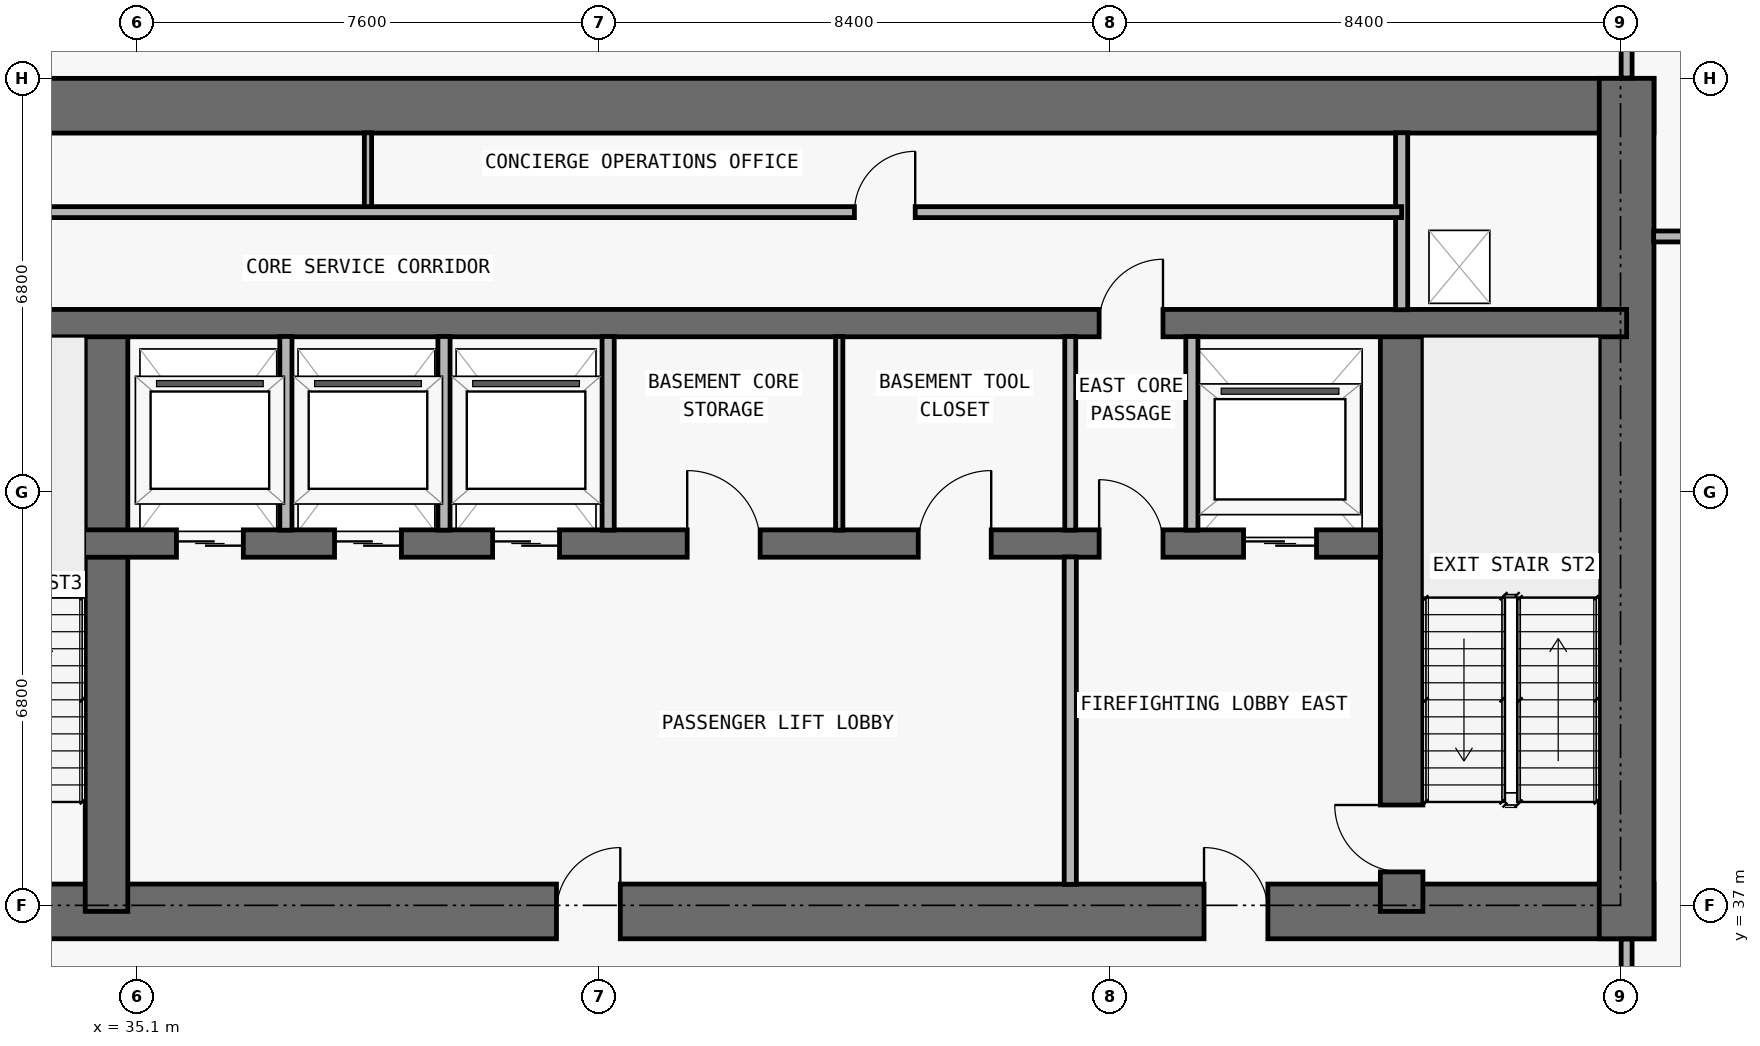
"""IFC4 building model, lengths in metres.
Left out: names, types, materials, properties, quantities, classifications, styles, units other than length and angle.
Written with IfcOpenShell. Run it as: python <this file> out.ifc"""

import sys

from ifc_helpers import new_model, si_unit, direction, frame, frame_2d, origin, place, context, subcontext, project, spatial, rectangle, extrude, element, fill, save


model = new_model("IFC4")
c1 = context("Model", 3, precision=1e-05, world=origin(), true_north=direction((0.0, 1.0)))
c2 = subcontext(c1, "Body", "Model", "MODEL_VIEW")
j1 = project(units=[si_unit("LENGTHUNIT", "METRE"), si_unit("PLANEANGLEUNIT", "RADIAN")], contexts=[c1])
p1 = place(None, origin())
s1 = spatial("IfcSite", under=j1, at=p1, CompositionType="ELEMENT")
p2 = place(p1, origin())
s2 = spatial("IfcBuilding", under=s1, at=p2, CompositionType="ELEMENT")
p3 = place(p2, frame((0.0, 0.0, -4.5)))
s3 = spatial("IfcBuildingStorey", under=s2, at=p3, CompositionType="ELEMENT", Elevation=-4.5)
p4 = place(p3, frame((17.75, 36.9, 0.0), z_axis=(0.0, 0.0, 1.0), x_axis=(1.0, 0.0, 0.0)))
e1 = element("IfcWall", 1, at=p4, inside=s3, PredefinedType="SHEAR", context=c2, shape_type="SweptSolid", body=[
    extrude(rectangle(XDim=42.3, YDim=0.9, at=frame_2d((21.15, 0.0))), origin(), (0.0, 0.0, 1.0), 4.2),
])
p5 = place(p4, frame((14.55, 0.0, 0.0)))
e2 = element("IfcOpeningElement", 2, at=p5, cuts=e1, PredefinedType="OPENING", context=c2, shape_type="SweptSolid", body=[
    extrude(rectangle(XDim=1.1, YDim=2.15, at=frame_2d((0.55, 1.075))), frame((0.0, 0.46, 0.0), z_axis=(0.0, -1.0, 0.0), x_axis=(1.0, 0.0, 0.0)), (0.0, 0.0, 1.0), 0.92),
])
p6 = place(p4, frame((6.4, 0.0, 0.0)))
e3 = element("IfcOpeningElement", 3, at=p6, cuts=e1, PredefinedType="OPENING", context=c2, shape_type="SweptSolid", body=[
    extrude(rectangle(XDim=1.05, YDim=2.15, at=frame_2d((0.525, 1.075))), frame((0.0, 0.46, 0.0), z_axis=(0.0, -1.0, 0.0), x_axis=(1.0, 0.0, 0.0)), (0.0, 0.0, 1.0), 0.92),
])
p7 = place(p4, frame((34.9, 0.0, 0.0)))
e4 = element("IfcOpeningElement", 4, at=p7, cuts=e1, PredefinedType="OPENING", context=c2, shape_type="SweptSolid", body=[
    extrude(rectangle(XDim=1.05, YDim=2.15, at=frame_2d((0.525, 1.075))), frame((0.0, 0.46, 0.0), z_axis=(0.0, -1.0, 0.0), x_axis=(1.0, 0.0, 0.0)), (0.0, 0.0, 1.0), 0.92),
])
p8 = place(p4, frame((11.012, 0.0, 0.0)))
e5 = element("IfcOpeningElement", 5, at=p8, cuts=e1, PredefinedType="OPENING", context=c2, shape_type="SweptSolid", body=[
    extrude(rectangle(XDim=1.05, YDim=2.15, at=frame_2d((0.525, 1.075))), frame((0.0, 0.46, 0.0), z_axis=(0.0, -1.0, 0.0), x_axis=(1.0, 0.0, 0.0)), (0.0, 0.0, 1.0), 0.92),
])
p9 = place(p4, frame((24.25, 0.0, 0.0)))
e6 = element("IfcOpeningElement", 6, at=p9, cuts=e1, PredefinedType="OPENING", context=c2, shape_type="SweptSolid", body=[
    extrude(rectangle(XDim=1.05, YDim=2.15, at=frame_2d((0.525, 1.075))), frame((0.0, 0.46, 0.0), z_axis=(0.0, -1.0, 0.0), x_axis=(1.0, 0.0, 0.0)), (0.0, 0.0, 1.0), 0.92),
])
p10 = place(p3, frame((17.75, 50.15, 0.0), z_axis=(0.0, 0.0, 1.0), x_axis=(1.0, 0.0, 0.0)))
e7 = element("IfcWall", 7, at=p10, inside=s3, PredefinedType="SHEAR", context=c2, shape_type="SweptSolid", body=[
    extrude(rectangle(XDim=42.3, YDim=0.9, at=frame_2d((21.15, 0.0))), origin(), (0.0, 0.0, 1.0), 4.2),
])
p11 = place(p3, frame((59.6, 36.45, 0.0), z_axis=(0.0, 0.0, 1.0), x_axis=(0.0, 1.0, 0.0)))
e8 = element("IfcWall", 8, at=p11, inside=s3, PredefinedType="SHEAR", context=c2, shape_type="SweptSolid", body=[
    extrude(rectangle(XDim=14.15, YDim=0.9, at=frame_2d((7.075, 0.0))), origin(), (0.0, 0.0, 1.0), 4.2),
])
p12 = place(p3, frame((55.9, 36.9, 0.0), z_axis=(0.0, 0.0, 1.0), x_axis=(0.0, 1.0, 0.0)))
e9 = element("IfcWall", 9, at=p12, inside=s3, PredefinedType="SHEAR", context=c2, shape_type="SweptSolid", body=[
    extrude(rectangle(XDim=9.675, YDim=0.7, at=frame_2d((4.837, 0.0))), origin(), (0.0, 0.0, 1.0), 4.2),
])
p13 = place(p12, frame((0.65, 0.0, 0.0)))
e10 = element("IfcOpeningElement", 10, at=p13, cuts=e9, PredefinedType="OPENING", context=c2, shape_type="SweptSolid", body=[
    extrude(rectangle(XDim=1.1, YDim=2.15, at=frame_2d((0.55, 1.075))), frame((0.0, 0.36, 0.0), z_axis=(0.0, -1.0, 0.0), x_axis=(1.0, 0.0, 0.0)), (0.0, 0.0, 1.0), 0.72),
])
p14 = place(p3, frame((34.6, 36.9, 0.0), z_axis=(0.0, 0.0, 1.0), x_axis=(0.0, 1.0, 0.0)))
e11 = element("IfcWall", 11, at=p14, inside=s3, PredefinedType="SHEAR", context=c2, shape_type="SweptSolid", body=[
    extrude(rectangle(XDim=9.675, YDim=0.7, at=frame_2d((4.837, 0.0))), origin(), (0.0, 0.0, 1.0), 4.2),
])
p15 = place(p3, frame((22.25, 42.95, 0.0), z_axis=(0.0, 0.0, 1.0), x_axis=(1.0, 0.0, 0.0)))
e12 = element("IfcWall", 12, at=p15, inside=s3, PredefinedType="SHEAR", context=c2, shape_type="SweptSolid", body=[
    extrude(rectangle(XDim=33.3, YDim=0.45, at=frame_2d((16.65, 0.0))), origin(), (0.0, 0.0, 1.0), 4.2),
])
p16 = place(p15, frame((1.05, 0.0, 0.0)))
e13 = element("IfcOpeningElement", 13, at=p16, cuts=e12, PredefinedType="OPENING", context=c2, shape_type="SweptSolid", body=[
    extrude(rectangle(XDim=1.2, YDim=2.2, at=frame_2d((0.6, 1.1))), frame((0.0, 0.235, 0.0), z_axis=(0.0, -1.0, 0.0), x_axis=(1.0, 0.0, 0.0)), (0.0, 0.0, 1.0), 0.47),
])
p17 = place(p15, frame((31.05, 0.0, 0.0)))
e14 = element("IfcOpeningElement", 14, at=p17, cuts=e12, PredefinedType="OPENING", context=c2, shape_type="SweptSolid", body=[
    extrude(rectangle(XDim=1.2, YDim=2.2, at=frame_2d((0.6, 1.1))), frame((0.0, 0.235, 0.0), z_axis=(0.0, -1.0, 0.0), x_axis=(1.0, 0.0, 0.0)), (0.0, 0.0, 1.0), 0.47),
])
p18 = place(p15, frame((13.5, 0.0, 0.0)))
e15 = element("IfcOpeningElement", 15, at=p18, cuts=e12, PredefinedType="OPENING", context=c2, shape_type="SweptSolid", body=[
    extrude(rectangle(XDim=1.1, YDim=2.2, at=frame_2d((0.55, 1.1))), frame((0.0, 0.235, 0.0), z_axis=(0.0, -1.0, 0.0), x_axis=(1.0, 0.0, 0.0)), (0.0, 0.0, 1.0), 0.47),
])
p19 = place(p15, frame((16.1, 0.0, 0.0)))
e16 = element("IfcOpeningElement", 16, at=p19, cuts=e12, PredefinedType="OPENING", context=c2, shape_type="SweptSolid", body=[
    extrude(rectangle(XDim=1.1, YDim=2.2, at=frame_2d((0.55, 1.1))), frame((0.0, 0.235, 0.0), z_axis=(0.0, -1.0, 0.0), x_axis=(1.0, 0.0, 0.0)), (0.0, 0.0, 1.0), 0.47),
])
p20 = place(p15, frame((18.7, 0.0, 0.0)))
e17 = element("IfcOpeningElement", 17, at=p20, cuts=e12, PredefinedType="OPENING", context=c2, shape_type="SweptSolid", body=[
    extrude(rectangle(XDim=1.1, YDim=2.2, at=frame_2d((0.55, 1.1))), frame((0.0, 0.235, 0.0), z_axis=(0.0, -1.0, 0.0), x_axis=(1.0, 0.0, 0.0)), (0.0, 0.0, 1.0), 0.47),
])
p21 = place(p15, frame((3.625, 0.0, 0.0)))
e18 = element("IfcOpeningElement", 18, at=p21, cuts=e12, PredefinedType="OPENING", context=c2, shape_type="SweptSolid", body=[
    extrude(rectangle(XDim=1.05, YDim=2.15, at=frame_2d((0.525, 1.075))), frame((0.0, 0.235, 0.0), z_axis=(0.0, -1.0, 0.0), x_axis=(1.0, 0.0, 0.0)), (0.0, 0.0, 1.0), 0.47),
])
p22 = place(p15, frame((28.675, 0.0, 0.0)))
e19 = element("IfcOpeningElement", 19, at=p22, cuts=e12, PredefinedType="OPENING", context=c2, shape_type="SweptSolid", body=[
    extrude(rectangle(XDim=1.05, YDim=2.15, at=frame_2d((0.525, 1.075))), frame((0.0, 0.235, 0.0), z_axis=(0.0, -1.0, 0.0), x_axis=(1.0, 0.0, 0.0)), (0.0, 0.0, 1.0), 0.47),
])
p23 = place(p15, frame((6.538, 0.0, 0.0)))
e20 = element("IfcOpeningElement", 20, at=p23, cuts=e12, PredefinedType="OPENING", context=c2, shape_type="SweptSolid", body=[
    extrude(rectangle(XDim=1.0, YDim=2.2, at=frame_2d((0.5, 1.1))), frame((0.0, 0.235, 0.0), z_axis=(0.0, -1.0, 0.0), x_axis=(1.0, 0.0, 0.0)), (0.0, 0.0, 1.0), 0.47),
])
p24 = place(p15, frame((21.9, 0.0, 0.0)))
e21 = element("IfcOpeningElement", 21, at=p24, cuts=e12, PredefinedType="OPENING", context=c2, shape_type="SweptSolid", body=[
    extrude(rectangle(XDim=1.2, YDim=2.2, at=frame_2d((0.6, 1.1))), frame((0.0, 0.235, 0.0), z_axis=(0.0, -1.0, 0.0), x_axis=(1.0, 0.0, 0.0)), (0.0, 0.0, 1.0), 0.47),
])
p25 = place(p15, frame((25.7, 0.0, 0.0)))
e22 = element("IfcOpeningElement", 22, at=p25, cuts=e12, PredefinedType="OPENING", context=c2, shape_type="SweptSolid", body=[
    extrude(rectangle(XDim=1.2, YDim=2.2, at=frame_2d((0.6, 1.1))), frame((0.0, 0.235, 0.0), z_axis=(0.0, -1.0, 0.0), x_axis=(1.0, 0.0, 0.0)), (0.0, 0.0, 1.0), 0.47),
])
p26 = place(p3, frame((18.2, 46.575, 0.0), z_axis=(0.0, 0.0, 1.0), x_axis=(1.0, 0.0, 0.0)))
e23 = element("IfcWall", 23, at=p26, inside=s3, PredefinedType="SHEAR", context=c2, shape_type="SweptSolid", body=[
    extrude(rectangle(XDim=41.4, YDim=0.45, at=frame_2d((20.7, 0.0))), origin(), (0.0, 0.0, 1.0), 4.2),
])
p27 = place(p26, frame((7.675, 0.0, 0.0)))
e24 = element("IfcOpeningElement", 24, at=p27, cuts=e23, PredefinedType="OPENING", context=c2, shape_type="SweptSolid", body=[
    extrude(rectangle(XDim=1.05, YDim=2.15, at=frame_2d((0.525, 1.075))), frame((0.0, 0.235, 0.0), z_axis=(0.0, -1.0, 0.0), x_axis=(1.0, 0.0, 0.0)), (0.0, 0.0, 1.0), 0.47),
])
p28 = place(p26, frame((32.725, 0.0, 0.0)))
e25 = element("IfcOpeningElement", 25, at=p28, cuts=e23, PredefinedType="OPENING", context=c2, shape_type="SweptSolid", body=[
    extrude(rectangle(XDim=1.05, YDim=2.15, at=frame_2d((0.525, 1.075))), frame((0.0, 0.235, 0.0), z_axis=(0.0, -1.0, 0.0), x_axis=(1.0, 0.0, 0.0)), (0.0, 0.0, 1.0), 0.47),
])
p29 = place(p3, frame((37.55, 43.17, 0.0), z_axis=(0.0, 0.0, 1.0), x_axis=(0.0, 1.0, 0.0)))
e26 = element("IfcWall", 26, at=p29, inside=s3, PredefinedType="PARTITIONING", context=c2, shape_type="SweptSolid", body=[
    extrude(rectangle(XDim=3.185, YDim=0.2, at=frame_2d((1.593, 0.0))), origin(), (0.0, 0.0, 1.0), 4.2),
])
p30 = place(p3, frame((38.9, 48.4, 0.0), z_axis=(0.0, 0.0, 1.0), x_axis=(0.0, 1.0, 0.0)))
e27 = element("IfcWall", 27, at=p30, inside=s3, PredefinedType="PARTITIONING", context=c2, shape_type="SweptSolid", body=[
    extrude(rectangle(XDim=1.305, YDim=0.12, at=frame_2d((0.653, 0.0))), origin(), (0.0, 0.0, 1.0), 4.2),
])
for number, where, z_axis, x_axis in (
    (28, (40.15, 43.17, 0.0), (0.0, 0.0, 1.0), (0.0, 1.0, 0.0)),
    (29, (42.85, 43.17, 0.0), (0.0, 0.0, 1.0), (0.0, 1.0, 0.0)),
):
    element("IfcWall", number, at=place(p3, frame(where, z_axis=z_axis, x_axis=x_axis)), inside=s3, PredefinedType="PARTITIONING", context=c2, shape_type="SweptSolid", body=[
        extrude(rectangle(XDim=3.185, YDim=0.2, at=frame_2d((1.593, 0.0))), origin(), (0.0, 0.0, 1.0), 4.2),
    ])
p31 = place(p3, frame((46.65, 43.17, 0.0), z_axis=(0.0, 0.0, 1.0), x_axis=(0.0, 1.0, 0.0)))
e30 = element("IfcWall", 30, at=p31, inside=s3, PredefinedType="PARTITIONING", context=c2, shape_type="SweptSolid", body=[
    extrude(rectangle(XDim=3.185, YDim=0.12, at=frame_2d((1.593, 0.0))), origin(), (0.0, 0.0, 1.0), 4.2),
])
p32 = place(p3, frame((50.45, 37.345, 0.0), z_axis=(0.0, 0.0, 1.0), x_axis=(0.0, 1.0, 0.0)))
e31 = element("IfcWall", 31, at=p32, inside=s3, PredefinedType="PARTITIONING", context=c2, shape_type="SweptSolid", body=[
    extrude(rectangle(XDim=5.385, YDim=0.2, at=frame_2d((2.692, 0.0))), origin(), (0.0, 0.0, 1.0), 4.2),
])
p33 = place(p3, frame((50.45, 43.17, 0.0), z_axis=(0.0, 0.0, 1.0), x_axis=(0.0, 1.0, 0.0)))
e32 = element("IfcWall", 32, at=p33, inside=s3, PredefinedType="PARTITIONING", context=c2, shape_type="SweptSolid", body=[
    extrude(rectangle(XDim=3.185, YDim=0.18, at=frame_2d((1.593, 0.0))), origin(), (0.0, 0.0, 1.0), 4.2),
])
p34 = place(p3, frame((52.45, 43.17, 0.0), z_axis=(0.0, 0.0, 1.0), x_axis=(0.0, 1.0, 0.0)))
e33 = element("IfcWall", 33, at=p34, inside=s3, PredefinedType="PARTITIONING", context=c2, shape_type="SweptSolid", body=[
    extrude(rectangle(XDim=3.185, YDim=0.2, at=frame_2d((1.593, 0.0))), origin(), (0.0, 0.0, 1.0), 4.2),
])
p35 = place(p3, frame((55.9, 46.795, 0.0), z_axis=(0.0, 0.0, 1.0), x_axis=(0.0, 1.0, 0.0)))
e34 = element("IfcWall", 34, at=p35, inside=s3, PredefinedType="PARTITIONING", context=c2, shape_type="SweptSolid", body=[
    extrude(rectangle(XDim=2.91, YDim=0.2, at=frame_2d((1.455, 0.0))), origin(), (0.0, 0.0, 1.0), 4.2),
])
p36 = place(p3, frame((59.6, 34.4, 0.0), z_axis=(0.0, 0.0, 1.0), x_axis=(0.0, 1.0, 0.0)))
e35 = element("IfcWall", 35, at=p36, inside=s3, PredefinedType="PARTITIONING", context=c2, shape_type="SweptSolid", body=[
    extrude(rectangle(XDim=2.045, YDim=0.18, at=frame_2d((1.022, 0.0))), origin(), (0.0, 0.0, 1.0), 3.085),
])
p37 = place(p3, frame((59.6, 50.605, 0.0), z_axis=(0.0, 0.0, 1.0), x_axis=(0.0, 1.0, 0.0)))
e36 = element("IfcWall", 36, at=p37, inside=s3, PredefinedType="PARTITIONING", context=c2, shape_type="SweptSolid", body=[
    extrude(rectangle(XDim=2.195, YDim=0.18, at=frame_2d((1.098, 0.0))), origin(), (0.0, 0.0, 1.0), 4.2),
])
p38 = place(p3, frame((60.045, 48.0, 0.0), z_axis=(0.0, 0.0, 1.0), x_axis=(1.0, 0.0, 0.0)))
e37 = element("IfcWall", 37, at=p38, inside=s3, PredefinedType="PARTITIONING", context=c2, shape_type="SweptSolid", body=[
    extrude(rectangle(XDim=9.6, YDim=0.18, at=frame_2d((4.8, 0.0))), origin(), (0.0, 0.0, 1.0), 4.2),
])
p39 = place(p38, frame((2.302, 0.0, 0.0)))
e38 = element("IfcOpeningElement", 38, at=p39, cuts=e37, PredefinedType="OPENING", context=c2, shape_type="SweptSolid", body=[
    extrude(rectangle(XDim=0.85, YDim=2.1, at=frame_2d((0.425, 1.05))), frame((0.0, 0.1, 0.0), z_axis=(0.0, -1.0, 0.0), x_axis=(1.0, 0.0, 0.0)), (0.0, 0.0, 1.0), 0.2),
])
p40 = place(p3, frame((21.9, 48.4, 0.0), z_axis=(0.0, 0.0, 1.0), x_axis=(1.0, 0.0, 0.0)))
e39 = element("IfcWall", 39, at=p40, inside=s3, PredefinedType="PARTITIONING", context=c2, shape_type="SweptSolid", body=[
    extrude(rectangle(XDim=34.0, YDim=0.18, at=frame_2d((17.0, 0.0))), origin(), (0.0, 0.0, 1.0), 4.2),
])
p41 = place(p40, frame((8.0, 0.0, 0.0)))
e40 = element("IfcOpeningElement", 40, at=p41, cuts=e39, PredefinedType="OPENING", context=c2, shape_type="SweptSolid", body=[
    extrude(rectangle(XDim=1.0, YDim=2.2, at=frame_2d((0.5, 1.1))), frame((0.0, 0.1, 0.0), z_axis=(0.0, -1.0, 0.0), x_axis=(1.0, 0.0, 0.0)), (0.0, 0.0, 1.0), 0.2),
])
p42 = place(p40, frame((25.0, 0.0, 0.0)))
e41 = element("IfcOpeningElement", 41, at=p42, cuts=e39, PredefinedType="OPENING", context=c2, shape_type="SweptSolid", body=[
    extrude(rectangle(XDim=1.0, YDim=2.2, at=frame_2d((0.5, 1.1))), frame((0.0, 0.1, 0.0), z_axis=(0.0, -1.0, 0.0), x_axis=(1.0, 0.0, 0.0)), (0.0, 0.0, 1.0), 0.2),
])
p43 = place(p17, origin())
e42 = element("IfcDoor", 42, at=p43, inside=s3, OperationType="DOUBLE_DOOR_SLIDING", PredefinedType="DOOR", context=c2, shape_type="SweptSolid", body=[
    extrude(rectangle(XDim=1.2, YDim=2.2, at=frame_2d((0.6, 1.1))), frame((0.0, 0.025, 0.0), z_axis=(0.0, -1.0, 0.0), x_axis=(1.0, 0.0, 0.0)), (0.0, 0.0, 1.0), 0.05),
])
fill(e14, e42)
p44 = place(p18, origin())
e43 = element("IfcDoor", 43, at=p44, inside=s3, OperationType="DOUBLE_DOOR_SLIDING", PredefinedType="DOOR", context=c2, shape_type="SweptSolid", body=[
    extrude(rectangle(XDim=1.1, YDim=2.2, at=frame_2d((0.55, 1.1))), frame((0.0, 0.025, 0.0), z_axis=(0.0, -1.0, 0.0), x_axis=(1.0, 0.0, 0.0)), (0.0, 0.0, 1.0), 0.05),
])
fill(e15, e43)
p45 = place(p19, origin())
e44 = element("IfcDoor", 44, at=p45, inside=s3, OperationType="DOUBLE_DOOR_SLIDING", PredefinedType="DOOR", context=c2, shape_type="SweptSolid", body=[
    extrude(rectangle(XDim=1.1, YDim=2.2, at=frame_2d((0.55, 1.1))), frame((0.0, 0.025, 0.0), z_axis=(0.0, -1.0, 0.0), x_axis=(1.0, 0.0, 0.0)), (0.0, 0.0, 1.0), 0.05),
])
fill(e16, e44)
p46 = place(p20, origin())
e45 = element("IfcDoor", 45, at=p46, inside=s3, OperationType="DOUBLE_DOOR_SLIDING", PredefinedType="DOOR", context=c2, shape_type="SweptSolid", body=[
    extrude(rectangle(XDim=1.1, YDim=2.2, at=frame_2d((0.55, 1.1))), frame((0.0, 0.025, 0.0), z_axis=(0.0, -1.0, 0.0), x_axis=(1.0, 0.0, 0.0)), (0.0, 0.0, 1.0), 0.05),
])
fill(e17, e45)
p47 = place(p7, origin())
e46 = element("IfcDoor", 46, at=p47, inside=s3, OperationType="SINGLE_SWING_LEFT", PredefinedType="DOOR", context=c2, shape_type="SweptSolid", body=[
    extrude(rectangle(XDim=1.05, YDim=2.15, at=frame_2d((0.525, 1.075))), frame((0.0, 0.025, 0.0), z_axis=(0.0, -1.0, 0.0), x_axis=(1.0, 0.0, 0.0)), (0.0, 0.0, 1.0), 0.05),
])
fill(e4, e46)
p48 = place(p13, origin())
e47 = element("IfcDoor", 47, at=p48, inside=s3, OperationType="SINGLE_SWING_RIGHT", PredefinedType="DOOR", context=c2, shape_type="SweptSolid", body=[
    extrude(rectangle(XDim=1.1, YDim=2.15, at=frame_2d((0.55, 1.075))), frame((0.0, 0.025, 0.0), z_axis=(0.0, -1.0, 0.0), x_axis=(1.0, 0.0, 0.0)), (0.0, 0.0, 1.0), 0.05),
])
fill(e10, e47)
p49 = place(p22, origin())
e48 = element("IfcDoor", 48, at=p49, inside=s3, OperationType="SINGLE_SWING_LEFT", PredefinedType="DOOR", context=c2, shape_type="SweptSolid", body=[
    extrude(rectangle(XDim=1.05, YDim=2.15, at=frame_2d((0.525, 1.075))), frame((0.0, 0.025, 0.0), z_axis=(0.0, -1.0, 0.0), x_axis=(1.0, 0.0, 0.0)), (0.0, 0.0, 1.0), 0.05),
])
fill(e19, e48)
p50 = place(p9, origin())
e49 = element("IfcDoor", 49, at=p50, inside=s3, OperationType="SINGLE_SWING_RIGHT", PredefinedType="DOOR", context=c2, shape_type="SweptSolid", body=[
    extrude(rectangle(XDim=1.05, YDim=2.15, at=frame_2d((0.525, 1.075))), frame((0.0, 0.025, 0.0), z_axis=(0.0, -1.0, 0.0), x_axis=(1.0, 0.0, 0.0)), (0.0, 0.0, 1.0), 0.05),
])
fill(e6, e49)
p51 = place(p24, origin())
e50 = element("IfcDoor", 50, at=p51, inside=s3, OperationType="SINGLE_SWING_LEFT", PredefinedType="DOOR", context=c2, shape_type="SweptSolid", body=[
    extrude(rectangle(XDim=1.2, YDim=2.2, at=frame_2d((0.6, 1.1))), frame((0.0, 0.025, 0.0), z_axis=(0.0, -1.0, 0.0), x_axis=(1.0, 0.0, 0.0)), (0.0, 0.0, 1.0), 0.05),
])
fill(e21, e50)
p52 = place(p25, origin())
e51 = element("IfcDoor", 51, at=p52, inside=s3, OperationType="SINGLE_SWING_RIGHT", PredefinedType="DOOR", context=c2, shape_type="SweptSolid", body=[
    extrude(rectangle(XDim=1.2, YDim=2.2, at=frame_2d((0.6, 1.1))), frame((0.0, 0.025, 0.0), z_axis=(0.0, -1.0, 0.0), x_axis=(1.0, 0.0, 0.0)), (0.0, 0.0, 1.0), 0.05),
])
fill(e22, e51)
p53 = place(p28, origin())
e52 = element("IfcDoor", 52, at=p53, inside=s3, OperationType="SINGLE_SWING_RIGHT", PredefinedType="DOOR", context=c2, shape_type="SweptSolid", body=[
    extrude(rectangle(XDim=1.05, YDim=2.15, at=frame_2d((0.525, 1.075))), frame((0.0, 0.025, 0.0), z_axis=(0.0, -1.0, 0.0), x_axis=(1.0, 0.0, 0.0)), (0.0, 0.0, 1.0), 0.05),
])
fill(e25, e52)
p54 = place(p42, origin())
e53 = element("IfcDoor", 53, at=p54, inside=s3, OperationType="SINGLE_SWING_RIGHT", PredefinedType="DOOR", context=c2, shape_type="SweptSolid", body=[
    extrude(rectangle(XDim=1.0, YDim=2.2, at=frame_2d((0.5, 1.1))), frame((0.0, 0.025, 0.0), z_axis=(0.0, -1.0, 0.0), x_axis=(1.0, 0.0, 0.0)), (0.0, 0.0, 1.0), 0.05),
])
fill(e41, e53)
save(model, sys.argv[1])
